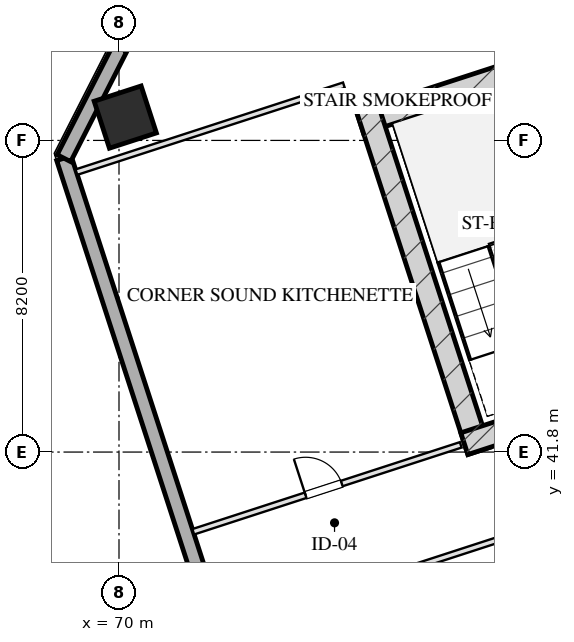
"""IFC4 building model, lengths in metres.
Left out: names, types, materials, properties, quantities, classifications, styles, units other than length and angle.
Written with IfcOpenShell. Run it as: python <this file> out.ifc"""

import sys

from ifc_helpers import new_model, si_unit, direction, frame, frame_2d, origin, origin_2d, place, context, subcontext, project, spatial, rectangle, hollow_rectangle, extrude, element, fill, save


model = new_model("IFC4")
c1 = context("Model", 3, precision=1e-05, world=origin(), true_north=direction((0.0, 1.0)))
c2 = subcontext(c1, "Body", "Model", "MODEL_VIEW")
j1 = project(units=[si_unit("LENGTHUNIT", "METRE"), si_unit("PLANEANGLEUNIT", "RADIAN")], contexts=[c1])
p1 = place(None, origin())
s1 = spatial("IfcSite", under=j1, at=p1, CompositionType="ELEMENT")
p2 = place(p1, origin())
s2 = spatial("IfcBuilding", under=s1, at=p2, CompositionType="ELEMENT")
p3 = place(p2, frame((0.0, 0.0, 177.1)))
s3 = spatial("IfcBuildingStorey", under=s2, at=p3, CompositionType="ELEMENT", Elevation=177.1)
p4 = place(p3, frame((76.344, 50.466, 0.0), z_axis=(0.0, 0.0, 1.0), x_axis=(0.951055727519, 0.309019421968, 0.0)))
e1 = element("IfcWall", 1, at=p4, inside=s3, PredefinedType="SHEAR", context=c2, shape_type="SweptSolid", body=[
    extrude(rectangle(XDim=16.4, YDim=0.6, at=frame_2d((8.2, 0.0))), origin(), (0.0, 0.0, 1.0), 3.45),
])
p5 = place(p3, frame((79.466, 41.828, 0.0), z_axis=(0.0, 0.0, 1.0), x_axis=(-0.309041232772, 0.951048640421, 0.0)))
e2 = element("IfcWall", 2, at=p5, inside=s3, PredefinedType="SHEAR", context=c2, shape_type="SweptSolid", body=[
    extrude(rectangle(XDim=9.48, YDim=0.6, at=frame_2d((4.74, 0.0))), origin(), (0.0, 0.0, 1.0), 3.45),
])
p6 = place(p3, frame((79.087, 42.021, 0.0), z_axis=(0.0, 0.0, 1.0), x_axis=(0.951062550203, 0.3089984233, 0.0)))
e3 = element("IfcWall", 3, at=p6, inside=s3, PredefinedType="SHEAR", context=c2, shape_type="SweptSolid", body=[
    extrude(rectangle(XDim=4.22, YDim=0.6, at=frame_2d((2.11, 0.0))), origin(), (0.0, 0.0, 1.0), 3.45),
])
p7 = place(p3, frame((70.165, 50.614, 0.0), z_axis=(0.0, 0.0, 1.0), x_axis=(0.951056516295, 0.309016994375, 0.0)))
e4 = element("IfcColumn", 4, at=p7, inside=s3, PredefinedType="COLUMN", context=c2, shape_type="SweptSolid", body=[
    extrude(hollow_rectangle(XDim=1.3, YDim=1.3, WallThickness=0.045, at=origin_2d()), origin(), (0.0, 0.0, 1.0), 3.451),
])
p8 = place(p3, frame((81.776, 8.827, 0.0), z_axis=(0.0, 0.0, 1.0), x_axis=(-0.309014228706, 0.951057414911, 0.0)))
e5 = element("IfcWall", 5, at=p8, inside=s3, PredefinedType="SOLIDWALL", context=c2, shape_type="SweptSolid", body=[
    extrude(rectangle(XDim=42.8, YDim=0.4, at=frame_2d((21.4, 0.0))), origin(), (0.0, 0.0, 1.0), 2.61),
])
p9 = place(p8, frame((13.95, 0.0, 0.75)))
e6 = element("IfcOpeningElement", 6, at=p9, cuts=e5, PredefinedType="OPENING", context=c2, shape_type="SweptSolid", body=[
    extrude(rectangle(XDim=2.1, YDim=1.46, at=frame_2d((1.05, 0.73))), frame((0.0, 0.21, 0.0), z_axis=(0.0, -1.0, 0.0), x_axis=(1.0, 0.0, 0.0)), (0.0, 0.0, 1.0), 0.42),
])
p10 = place(p8, frame((17.75, 0.0, 0.75)))
e7 = element("IfcOpeningElement", 7, at=p10, cuts=e5, PredefinedType="OPENING", context=c2, shape_type="SweptSolid", body=[
    extrude(rectangle(XDim=2.1, YDim=1.46, at=frame_2d((1.05, 0.73))), frame((0.0, 0.21, 0.0), z_axis=(0.0, -1.0, 0.0), x_axis=(1.0, 0.0, 0.0)), (0.0, 0.0, 1.0), 0.42),
])
p11 = place(p8, frame((23.95, 0.0, 0.0)))
e8 = element("IfcOpeningElement", 8, at=p11, cuts=e5, PredefinedType="OPENING", context=c2, shape_type="SweptSolid", body=[
    extrude(rectangle(XDim=1.1, YDim=2.15, at=frame_2d((0.55, 1.075))), frame((0.0, 0.21, 0.0), z_axis=(0.0, -1.0, 0.0), x_axis=(1.0, 0.0, 0.0)), (0.0, 0.0, 1.0), 0.42),
])
p12 = place(p3, frame((68.551, 49.532, 0.0), z_axis=(0.0, 0.0, 1.0), x_axis=(0.454019523198, 0.890991735402, 0.0)))
e9 = element("IfcWall", 9, at=p12, inside=s3, PredefinedType="SOLIDWALL", context=c2, shape_type="SweptSolid", body=[
    extrude(rectangle(XDim=3.394, YDim=0.4, at=frame_2d((1.697, 0.0))), origin(), (0.0, 0.0, 1.0), 2.61),
])
p13 = place(p3, frame((68.88, 49.166, 0.0), z_axis=(0.0, 0.0, 1.0), x_axis=(0.951060977215, 0.309003264738, 0.0)))
e10 = element("IfcWall", 10, at=p13, inside=s3, PredefinedType="PARTITIONING", context=c2, shape_type="SweptSolid", body=[
    extrude(rectangle(XDim=7.4, YDim=0.15, at=frame_2d((3.7, 0.0))), origin(), (0.0, 0.0, 1.0), 3.175),
])
p14 = place(p3, frame((71.955, 39.703, 0.0), z_axis=(0.0, 0.0, 1.0), x_axis=(0.951060977215, 0.309003264738, 0.0)))
e11 = element("IfcWall", 11, at=p14, inside=s3, PredefinedType="PARTITIONING", context=c2, shape_type="SweptSolid", body=[
    extrude(rectangle(XDim=7.4, YDim=0.15, at=frame_2d((3.7, 0.0))), origin(), (0.0, 0.0, 1.0), 3.175),
])
p15 = place(p14, frame((3.108, 0.0, 0.0)))
e12 = element("IfcOpeningElement", 12, at=p15, cuts=e11, PredefinedType="OPENING", context=c2, shape_type="SweptSolid", body=[
    extrude(rectangle(XDim=1.0, YDim=2.05, at=frame_2d((0.5, 1.025))), frame((0.0, 0.085, 0.0), z_axis=(0.0, -1.0, 0.0), x_axis=(1.0, 0.0, 0.0)), (0.0, 0.0, 1.0), 0.17),
])
p16 = place(p3, frame((72.783, 37.154, 0.0), z_axis=(0.0, 0.0, 1.0), x_axis=(0.951056999652, 0.309015506751, 0.0)))
e13 = element("IfcWall", 13, at=p16, inside=s3, PredefinedType="PARTITIONING", context=c2, shape_type="SweptSolid", body=[
    extrude(rectangle(XDim=11.5, YDim=0.15, at=frame_2d((5.75, 0.0))), origin(), (0.0, 0.0, 1.0), 3.175),
])
p17 = place(p15, origin())
e14 = element("IfcDoor", 14, at=p17, inside=s3, OperationType="SINGLE_SWING_LEFT", PredefinedType="DOOR", context=c2, shape_type="SweptSolid", body=[
    extrude(rectangle(XDim=1.0, YDim=2.05, at=frame_2d((0.5, 1.025))), frame((0.0, 0.025, 0.0), z_axis=(0.0, -1.0, 0.0), x_axis=(1.0, 0.0, 0.0)), (0.0, 0.0, 1.0), 0.05),
])
fill(e12, e14)
save(model, sys.argv[1])
